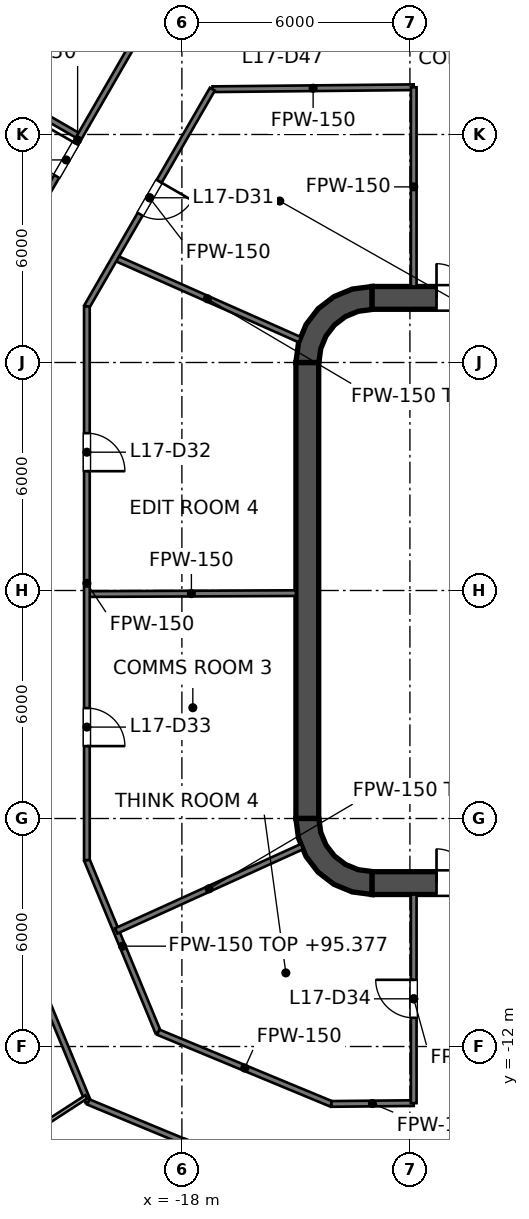
"""IFC4 building model, lengths in metres.
Left out: names, types, materials, properties, quantities, classifications, styles, units other than length and angle.
Written with IfcOpenShell. Run it as: python <this file> out.ifc"""

import sys

from ifc_helpers import new_model, si_unit, direction, frame, frame_2d, origin, place, context, subcontext, project, spatial, polyline, rectangle, outline, extrude, element, fill, save


model = new_model("IFC4")
c1 = context("Model", 3, precision=1e-05, world=origin(), true_north=direction((0.0, 1.0)))
c2 = subcontext(c1, "Body", "Model", "MODEL_VIEW")
j1 = project(units=[si_unit("LENGTHUNIT", "METRE"), si_unit("PLANEANGLEUNIT", "RADIAN")], contexts=[c1])
p1 = place(None, origin())
s1 = spatial("IfcSite", under=j1, at=p1, CompositionType="ELEMENT")
p2 = place(p1, origin())
s2 = spatial("IfcBuilding", under=s1, at=p2, CompositionType="ELEMENT")
p3 = place(p2, frame((0.0, 0.0, 92.4)))
s3 = spatial("IfcBuildingStorey", under=s2, at=p3, CompositionType="ELEMENT", Elevation=92.4)
p4 = place(p3, frame((-13.0, 7.7, 0.0), z_axis=(0.0, 0.0, 1.0), x_axis=(1.0, 0.0, 0.0)))
e1 = element("IfcWall", 1, at=p4, inside=s3, PredefinedType="SHEAR", context=c2, shape_type="SweptSolid", body=[
    extrude(rectangle(XDim=26.0, YDim=0.6, at=frame_2d((13.0, 0.0))), origin(), (0.0, 0.0, 1.0), 4.2),
])
p5 = place(p4, frame((1.7, 0.0, 0.0)))
e2 = element("IfcOpeningElement", 2, at=p5, cuts=e1, PredefinedType="OPENING", context=c2, shape_type="SweptSolid", body=[
    extrude(rectangle(XDim=1.8, YDim=2.1, at=frame_2d((0.9, 1.05))), frame((0.0, 0.3, 0.0), z_axis=(0.0, -1.0, 0.0), x_axis=(1.0, 0.0, 0.0)), (0.0, 0.0, 1.0), 0.6),
])
p6 = place(p4, frame((22.5, 0.0, 0.0)))
e3 = element("IfcOpeningElement", 3, at=p6, cuts=e1, PredefinedType="OPENING", context=c2, shape_type="SweptSolid", body=[
    extrude(rectangle(XDim=1.8, YDim=2.1, at=frame_2d((0.9, 1.05))), frame((0.0, 0.3, 0.0), z_axis=(0.0, -1.0, 0.0), x_axis=(1.0, 0.0, 0.0)), (0.0, 0.0, 1.0), 0.6),
])
p7 = place(p3, frame((-13.0, -7.7, 0.0), z_axis=(0.0, 0.0, 1.0), x_axis=(1.0, 0.0, 0.0)))
e4 = element("IfcWall", 4, at=p7, inside=s3, PredefinedType="SHEAR", context=c2, shape_type="SweptSolid", body=[
    extrude(rectangle(XDim=26.0, YDim=0.6, at=frame_2d((13.0, 0.0))), origin(), (0.0, 0.0, 1.0), 4.2),
])
p8 = place(p7, frame((1.7, 0.0, 0.0)))
e5 = element("IfcOpeningElement", 5, at=p8, cuts=e4, PredefinedType="OPENING", context=c2, shape_type="SweptSolid", body=[
    extrude(rectangle(XDim=1.8, YDim=2.1, at=frame_2d((0.9, 1.05))), frame((0.0, 0.3, 0.0), z_axis=(0.0, -1.0, 0.0), x_axis=(1.0, 0.0, 0.0)), (0.0, 0.0, 1.0), 0.6),
])
p9 = place(p7, frame((22.5, 0.0, 0.0)))
e6 = element("IfcOpeningElement", 6, at=p9, cuts=e4, PredefinedType="OPENING", context=c2, shape_type="SweptSolid", body=[
    extrude(rectangle(XDim=1.8, YDim=2.1, at=frame_2d((0.9, 1.05))), frame((0.0, 0.3, 0.0), z_axis=(0.0, -1.0, 0.0), x_axis=(1.0, 0.0, 0.0)), (0.0, 0.0, 1.0), 0.6),
])
p10 = place(p3, frame((-14.7, -6.0, 0.0), z_axis=(0.0, 0.0, 1.0), x_axis=(0.0, 1.0, 0.0)))
e7 = element("IfcWall", 7, at=p10, inside=s3, PredefinedType="SHEAR", context=c2, shape_type="SweptSolid", body=[
    extrude(rectangle(XDim=12.0, YDim=0.6, at=frame_2d((6.0, 0.0))), origin(), (0.0, 0.0, 1.0), 4.2),
])
p11 = place(p3, origin())
e8 = element("IfcWall", 8, at=p11, inside=s3, PredefinedType="SHEAR", context=c2, shape_type="SweptSolid", body=[
    extrude(outline(polyline([(-15.0, 6.0), (-14.395, 6.0), (-14.347, 6.361), (-14.208, 6.698), (-13.986, 6.986), (-13.698, 7.208), (-13.361, 7.347), (-13.0, 7.395), (-13.0, 8.0), (-13.518, 7.932), (-14.0, 7.732), (-14.414, 7.414), (-14.732, 7.0), (-14.932, 6.518), (-15.0, 6.0)])), origin(), (0.0, 0.0, 1.0), 4.2),
])
e9 = element("IfcWall", 9, at=p11, inside=s3, PredefinedType="SHEAR", context=c2, shape_type="SweptSolid", body=[
    extrude(outline(polyline([(-13.0, -8.0), (-13.0, -7.395), (-13.361, -7.347), (-13.698, -7.208), (-13.986, -6.986), (-14.208, -6.698), (-14.347, -6.361), (-14.395, -6.0), (-15.0, -6.0), (-14.932, -6.518), (-14.732, -7.0), (-14.414, -7.414), (-14.0, -7.732), (-13.518, -7.932), (-13.0, -8.0)])), origin(), (0.0, 0.0, 1.0), 4.2),
])
p12 = place(p3, frame((-11.8, -7.4, 0.0), z_axis=(0.0, 0.0, 1.0), x_axis=(0.0, 1.0, 0.0)))
e10 = element("IfcWall", 10, at=p12, inside=s3, PredefinedType="SOLIDWALL", context=c2, shape_type="SweptSolid", body=[
    extrude(rectangle(XDim=14.8, YDim=0.4, at=frame_2d((7.4, 0.0))), origin(), (0.0, 0.0, 1.0), 3.9),
])
p13 = place(p12, frame((11.2, 0.0, 0.0)))
e11 = element("IfcOpeningElement", 11, at=p13, cuts=e10, PredefinedType="OPENING", context=c2, shape_type="SweptSolid", body=[
    extrude(rectangle(XDim=1.1, YDim=2.1, at=frame_2d((0.55, 1.05))), frame((0.0, 0.2, 0.0), z_axis=(0.0, -1.0, 0.0), x_axis=(1.0, 0.0, 0.0)), (0.0, 0.0, 1.0), 0.4),
])
p14 = place(p12, frame((8.3, 0.0, 0.0)))
e12 = element("IfcOpeningElement", 12, at=p14, cuts=e10, PredefinedType="OPENING", context=c2, shape_type="SweptSolid", body=[
    extrude(rectangle(XDim=1.1, YDim=2.1, at=frame_2d((0.55, 1.05))), frame((0.0, 0.2, 0.0), z_axis=(0.0, -1.0, 0.0), x_axis=(1.0, 0.0, 0.0)), (0.0, 0.0, 1.0), 0.4),
])
p15 = place(p12, frame((5.4, 0.0, 0.0)))
e13 = element("IfcOpeningElement", 13, at=p15, cuts=e10, PredefinedType="OPENING", context=c2, shape_type="SweptSolid", body=[
    extrude(rectangle(XDim=1.1, YDim=2.1, at=frame_2d((0.55, 1.05))), frame((0.0, 0.2, 0.0), z_axis=(0.0, -1.0, 0.0), x_axis=(1.0, 0.0, 0.0)), (0.0, 0.0, 1.0), 0.4),
])
p16 = place(p12, frame((13.552, 0.0, 0.0)))
e14 = element("IfcOpeningElement", 14, at=p16, cuts=e10, PredefinedType="OPENING", context=c2, shape_type="SweptSolid", body=[
    extrude(rectangle(XDim=0.9, YDim=2.1, at=frame_2d((0.45, 1.05))), frame((0.0, 0.2, 0.0), z_axis=(0.0, -1.0, 0.0), x_axis=(1.0, 0.0, 0.0)), (0.0, 0.0, 1.0), 0.4),
])
p17 = place(p12, frame((0.347, 0.0, 0.0)))
e15 = element("IfcOpeningElement", 15, at=p17, cuts=e10, PredefinedType="OPENING", context=c2, shape_type="SweptSolid", body=[
    extrude(rectangle(XDim=0.9, YDim=2.1, at=frame_2d((0.45, 1.05))), frame((0.0, 0.2, 0.0), z_axis=(0.0, -1.0, 0.0), x_axis=(1.0, 0.0, 0.0)), (0.0, 0.0, 1.0), 0.4),
])
e16 = element("IfcWall", 16, at=p11, inside=s3, PredefinedType="SOLIDWALL", context=c2, shape_type="SweptSolid", body=[
    extrude(outline(polyline([(-12.0, -5.925), (-12.0, -5.675), (-14.15, -5.675), (-14.15, -3.025), (-12.0, -3.025), (-12.0, -2.775), (-14.15, -2.775), (-14.15, -0.125), (-12.0, -0.125), (-12.0, 0.125), (-14.15, 0.125), (-14.15, 2.775), (-12.0, 2.775), (-12.0, 3.025), (-14.15, 3.025), (-14.15, 5.675), (-12.0, 5.675), (-12.0, 5.925), (-14.15, 5.925), (-14.4, 5.925), (-14.4, 5.675), (-14.4, 3.025), (-14.4, 2.775), (-14.4, 0.125), (-14.4, -0.125), (-14.4, -2.775), (-14.4, -3.025), (-14.4, -5.675), (-14.4, -5.925), (-14.15, -5.925), (-12.0, -5.925)])), origin(), (0.0, 0.0, 1.0), 3.9),
])
p18 = place(p3, frame((-22.9, -7.572, 0.0), z_axis=(0.0, 0.0, 1.0), x_axis=(0.382367581622, -0.924010298928, 0.0)))
e17 = element("IfcWall", 17, at=p18, inside=s3, PredefinedType="PARTITIONING", context=c2, shape_type="SweptSolid", body=[
    extrude(rectangle(XDim=6.374, YDim=0.15, at=frame_2d((3.187, 0.0))), origin(), (0.0, 0.0, 1.0), 2.977),
])
p19 = place(p18, frame((2.6, 0.0, 0.0)))
e18 = element("IfcOpeningElement", 18, at=p19, cuts=e17, PredefinedType="OPENING", context=c2, shape_type="SweptSolid", body=[
    extrude(rectangle(XDim=1.0, YDim=2.1, at=frame_2d((0.5, 1.05))), frame((0.0, 0.075, 0.0), z_axis=(0.0, -1.0, 0.0), x_axis=(1.0, 0.0, 0.0)), (0.0, 0.0, 1.0), 0.15),
])
p20 = place(p3, frame((-20.5, -7.095, 0.0), z_axis=(0.0, 0.0, 1.0), x_axis=(0.382364990163, -0.924011371303, 0.0)))
e19 = element("IfcWall", 19, at=p20, inside=s3, PredefinedType="PARTITIONING", context=c2, shape_type="SweptSolid", body=[
    extrude(rectangle(XDim=4.902, YDim=0.15, at=frame_2d((2.451, 0.0))), origin(), (0.0, 0.0, 1.0), 2.977),
])
p21 = place(p3, frame((-25.131, 14.509, 0.0), z_axis=(0.0, 0.0, 1.0), x_axis=(0.866037334331, -0.499979335118, 0.0)))
e20 = element("IfcWall", 20, at=p21, inside=s3, PredefinedType="PARTITIONING", context=c2, shape_type="SweptSolid", body=[
    extrude(rectangle(XDim=5.128, YDim=0.15, at=frame_2d((2.564, 0.0))), origin(), (0.0, 0.0, 1.0), 3.045),
])
p22 = place(p3, frame((-19.76, 8.755, 0.0), z_axis=(0.0, 0.0, 1.0), x_axis=(0.91424834547, -0.405154245695, 0.0)))
e21 = element("IfcWall", 21, at=p22, inside=s3, PredefinedType="PARTITIONING", context=c2, shape_type="SweptSolid", body=[
    extrude(rectangle(XDim=5.318, YDim=0.15, at=frame_2d((2.659, 0.0))), origin(), (0.0, 0.0, 1.0), 2.977),
])
p23 = place(p3, frame((-20.46, -13.46, 0.0), z_axis=(0.0, 0.0, 1.0), x_axis=(0.923801547606, -0.382871650349, 0.0)))
e22 = element("IfcWall", 22, at=p23, inside=s3, PredefinedType="PARTITIONING", context=c2, shape_type="SweptSolid", body=[
    extrude(rectangle(XDim=6.415, YDim=0.15, at=frame_2d((3.208, 0.0))), origin(), (0.0, 0.0, 1.0), 2.968),
])
p24 = place(p23, frame((2.707, 0.0, 0.0)))
e23 = element("IfcOpeningElement", 23, at=p24, cuts=e22, PredefinedType="OPENING", context=c2, shape_type="SweptSolid", body=[
    extrude(rectangle(XDim=1.0, YDim=2.1, at=frame_2d((0.5, 1.05))), frame((0.0, 0.075, 0.0), z_axis=(0.0, -1.0, 0.0), x_axis=(1.0, 0.0, 0.0)), (0.0, 0.0, 1.0), 0.15),
])
p25 = place(p3, frame((-18.623, -11.623, 0.0), z_axis=(0.0, 0.0, 1.0), x_axis=(0.923791670587, -0.38289548098, 0.0)))
e24 = element("IfcWall", 24, at=p25, inside=s3, PredefinedType="PARTITIONING", context=c2, shape_type="SweptSolid", body=[
    extrude(rectangle(XDim=4.931, YDim=0.15, at=frame_2d((2.465, 0.0))), origin(), (0.0, 0.0, 1.0), 2.968),
])
p26 = place(p3, frame((-20.5, -0.094, 0.0), z_axis=(0.0, 0.0, 1.0), x_axis=(0.999990148138, 0.004438876723, 0.0)))
e25 = element("IfcWall", 25, at=p26, inside=s3, PredefinedType="PARTITIONING", context=c2, shape_type="SweptSolid", body=[
    extrude(rectangle(XDim=5.5, YDim=0.15, at=frame_2d((2.75, 0.0))), origin(), (0.0, 0.0, 1.0), 2.968),
])
p27 = place(p3, frame((-14.068, -13.511, 0.0), z_axis=(0.0, 0.0, 1.0), x_axis=(0.999950911515, 0.009908307647, 0.0)))
e26 = element("IfcWall", 26, at=p27, inside=s3, PredefinedType="PARTITIONING", context=c2, shape_type="SweptSolid", body=[
    extrude(rectangle(XDim=2.168, YDim=0.15, at=frame_2d((1.084, 0.0))), origin(), (0.0, 0.0, 1.0), 2.968),
])
p28 = place(p3, frame((-17.194, 13.191, 0.0), z_axis=(0.0, 0.0, 1.0), x_axis=(0.999950853109, 0.009914200296, 0.0)))
e27 = element("IfcWall", 27, at=p28, inside=s3, PredefinedType="PARTITIONING", context=c2, shape_type="SweptSolid", body=[
    extrude(rectangle(XDim=5.294, YDim=0.15, at=frame_2d((2.647, 0.0))), origin(), (0.0, 0.0, 1.0), 2.968),
])
p29 = place(p3, frame((-19.728, -8.958, 0.0), z_axis=(0.0, 0.0, 1.0), x_axis=(0.910629511797, 0.413223779863, 0.0)))
e28 = element("IfcWall", 28, at=p29, inside=s3, PredefinedType="PARTITIONING", context=c2, shape_type="SweptSolid", body=[
    extrude(rectangle(XDim=5.368, YDim=0.15, at=frame_2d((2.684, 0.0))), origin(), (0.0, 0.0, 1.0), 3.9),
])
p30 = place(p3, frame((-20.5, 7.474, 0.0), z_axis=(0.0, 0.0, 1.0), x_axis=(0.500012665616, 0.866018091164, 0.0)))
e29 = element("IfcWall", 29, at=p30, inside=s3, PredefinedType="PARTITIONING", context=c2, shape_type="SweptSolid", body=[
    extrude(rectangle(XDim=6.602, YDim=0.15, at=frame_2d((3.301, 0.0))), origin(), (0.0, 0.0, 1.0), 2.968),
])
p31 = place(p30, frame((2.803, 0.0, 0.0)))
e30 = element("IfcOpeningElement", 30, at=p31, cuts=e29, PredefinedType="OPENING", context=c2, shape_type="SweptSolid", body=[
    extrude(rectangle(XDim=1.0, YDim=2.1, at=frame_2d((0.5, 1.05))), frame((0.0, 0.075, 0.0), z_axis=(0.0, -1.0, 0.0), x_axis=(1.0, 0.0, 0.0)), (0.0, 0.0, 1.0), 0.15),
])
p32 = place(p3, frame((-22.9, 8.117, 0.0), z_axis=(0.0, 0.0, 1.0), x_axis=(0.5000050195, 0.866022505755, 0.0)))
e31 = element("IfcWall", 31, at=p32, inside=s3, PredefinedType="PARTITIONING", context=c2, shape_type="SweptSolid", body=[
    extrude(rectangle(XDim=8.626, YDim=0.15, at=frame_2d((4.313, 0.0))), origin(), (0.0, 0.0, 1.0), 2.968),
])
p33 = place(p32, frame((3.211, 0.0, 0.0)))
e32 = element("IfcOpeningElement", 32, at=p33, cuts=e31, PredefinedType="OPENING", context=c2, shape_type="SweptSolid", body=[
    extrude(rectangle(XDim=1.0, YDim=2.1, at=frame_2d((0.5, 1.05))), frame((0.0, 0.075, 0.0), z_axis=(0.0, -1.0, 0.0), x_axis=(1.0, 0.0, 0.0)), (0.0, 0.0, 1.0), 0.15),
])
p34 = place(p3, frame((-11.9, -13.49, 0.0), z_axis=(0.0, 0.0, 1.0), x_axis=(0.0, 1.0, 0.0)))
e33 = element("IfcWall", 33, at=p34, inside=s3, PredefinedType="PARTITIONING", context=c2, shape_type="SweptSolid", body=[
    extrude(rectangle(XDim=5.49, YDim=0.15, at=frame_2d((2.745, 0.0))), origin(), (0.0, 0.0, 1.0), 2.968),
])
p35 = place(p34, frame((2.245, 0.0, 0.0)))
e34 = element("IfcOpeningElement", 34, at=p35, cuts=e33, PredefinedType="OPENING", context=c2, shape_type="SweptSolid", body=[
    extrude(rectangle(XDim=1.0, YDim=2.1, at=frame_2d((0.5, 1.05))), frame((0.0, 0.075, 0.0), z_axis=(0.0, -1.0, 0.0), x_axis=(1.0, 0.0, 0.0)), (0.0, 0.0, 1.0), 0.15),
])
p36 = place(p3, frame((-11.9, 8.0, 0.0), z_axis=(0.0, 0.0, 1.0), x_axis=(0.0, 1.0, 0.0)))
e35 = element("IfcWall", 35, at=p36, inside=s3, PredefinedType="PARTITIONING", context=c2, shape_type="SweptSolid", body=[
    extrude(rectangle(XDim=5.243, YDim=0.15, at=frame_2d((2.622, 0.0))), origin(), (0.0, 0.0, 1.0), 2.968),
])
p37 = place(p3, frame((-20.5, -7.095, 0.0), z_axis=(0.0, 0.0, 1.0), x_axis=(0.0, 1.0, 0.0)))
e36 = element("IfcWall", 36, at=p37, inside=s3, PredefinedType="PARTITIONING", context=c2, shape_type="SweptSolid", body=[
    extrude(rectangle(XDim=14.569, YDim=0.15, at=frame_2d((7.285, 0.0))), origin(), (0.0, 0.0, 1.0), 2.968),
])
p38 = place(p37, frame((10.234, 0.0, 0.0)))
e37 = element("IfcOpeningElement", 37, at=p38, cuts=e36, PredefinedType="OPENING", context=c2, shape_type="SweptSolid", body=[
    extrude(rectangle(XDim=1.0, YDim=2.1, at=frame_2d((0.5, 1.05))), frame((0.0, 0.075, 0.0), z_axis=(0.0, -1.0, 0.0), x_axis=(1.0, 0.0, 0.0)), (0.0, 0.0, 1.0), 0.15),
])
p39 = place(p37, frame((3.0, 0.0, 0.0)))
e38 = element("IfcOpeningElement", 38, at=p39, cuts=e36, PredefinedType="OPENING", context=c2, shape_type="SweptSolid", body=[
    extrude(rectangle(XDim=1.0, YDim=2.1, at=frame_2d((0.5, 1.05))), frame((0.0, 0.075, 0.0), z_axis=(0.0, -1.0, 0.0), x_axis=(1.0, 0.0, 0.0)), (0.0, 0.0, 1.0), 0.15),
])
p40 = place(p3, frame((-23.706, -15.395, 0.0), z_axis=(0.0, 0.0, 1.0), x_axis=(0.838733884708, 0.544541523341, 0.0)))
e39 = element("IfcWall", 39, at=p40, inside=s3, PredefinedType="PARTITIONING", context=c2, shape_type="SweptSolid", body=[
    extrude(rectangle(XDim=3.803, YDim=0.1, at=frame_2d((1.902, 0.0))), origin(), (0.0, 0.0, 1.0), 3.9),
])
p41 = place(p13, origin())
e40 = element("IfcDoor", 40, at=p41, inside=s3, OperationType="DOUBLE_DOOR_SLIDING", PredefinedType="DOOR", context=c2, shape_type="SweptSolid", body=[
    extrude(rectangle(XDim=1.1, YDim=2.1, at=frame_2d((0.55, 1.05))), frame((0.0, 0.025, 0.0), z_axis=(0.0, -1.0, 0.0), x_axis=(1.0, 0.0, 0.0)), (0.0, 0.0, 1.0), 0.05),
])
fill(e11, e40)
p42 = place(p14, origin())
e41 = element("IfcDoor", 41, at=p42, inside=s3, OperationType="DOUBLE_DOOR_SLIDING", PredefinedType="DOOR", context=c2, shape_type="SweptSolid", body=[
    extrude(rectangle(XDim=1.1, YDim=2.1, at=frame_2d((0.55, 1.05))), frame((0.0, 0.025, 0.0), z_axis=(0.0, -1.0, 0.0), x_axis=(1.0, 0.0, 0.0)), (0.0, 0.0, 1.0), 0.05),
])
fill(e12, e41)
p43 = place(p15, origin())
e42 = element("IfcDoor", 42, at=p43, inside=s3, OperationType="DOUBLE_DOOR_SLIDING", PredefinedType="DOOR", context=c2, shape_type="SweptSolid", body=[
    extrude(rectangle(XDim=1.1, YDim=2.1, at=frame_2d((0.55, 1.05))), frame((0.0, 0.025, 0.0), z_axis=(0.0, -1.0, 0.0), x_axis=(1.0, 0.0, 0.0)), (0.0, 0.0, 1.0), 0.05),
])
fill(e13, e42)
p44 = place(p16, origin())
e43 = element("IfcDoor", 43, at=p44, inside=s3, OperationType="SINGLE_SWING_LEFT", PredefinedType="DOOR", context=c2, shape_type="SweptSolid", body=[
    extrude(rectangle(XDim=0.9, YDim=2.1, at=frame_2d((0.45, 1.05))), frame((0.0, 0.025, 0.0), z_axis=(0.0, -1.0, 0.0), x_axis=(1.0, 0.0, 0.0)), (0.0, 0.0, 1.0), 0.05),
])
fill(e14, e43)
p45 = place(p17, origin())
e44 = element("IfcDoor", 44, at=p45, inside=s3, OperationType="SINGLE_SWING_LEFT", PredefinedType="DOOR", context=c2, shape_type="SweptSolid", body=[
    extrude(rectangle(XDim=0.9, YDim=2.1, at=frame_2d((0.45, 1.05))), frame((0.0, 0.025, 0.0), z_axis=(0.0, -1.0, 0.0), x_axis=(1.0, 0.0, 0.0)), (0.0, 0.0, 1.0), 0.05),
])
fill(e15, e44)
p46 = place(p5, origin())
e45 = element("IfcDoor", 45, at=p46, inside=s3, OperationType="DOUBLE_DOOR_SINGLE_SWING", PredefinedType="DOOR", context=c2, shape_type="SweptSolid", body=[
    extrude(rectangle(XDim=1.8, YDim=2.1, at=frame_2d((0.9, 1.05))), frame((0.0, 0.025, 0.0), z_axis=(0.0, -1.0, 0.0), x_axis=(1.0, 0.0, 0.0)), (0.0, 0.0, 1.0), 0.05),
])
fill(e2, e45)
p47 = place(p8, origin())
e46 = element("IfcDoor", 46, at=p47, inside=s3, OperationType="DOUBLE_DOOR_SINGLE_SWING", PredefinedType="DOOR", context=c2, shape_type="SweptSolid", body=[
    extrude(rectangle(XDim=1.8, YDim=2.1, at=frame_2d((0.9, 1.05))), frame((0.0, 0.025, 0.0), z_axis=(0.0, -1.0, 0.0), x_axis=(1.0, 0.0, 0.0)), (0.0, 0.0, 1.0), 0.05),
])
fill(e5, e46)
p48 = place(p31, origin())
e47 = element("IfcDoor", 47, at=p48, inside=s3, OperationType="SINGLE_SWING_RIGHT", PredefinedType="DOOR", context=c2, shape_type="SweptSolid", body=[
    extrude(rectangle(XDim=1.0, YDim=2.1, at=frame_2d((0.5, 1.05))), frame((0.0, 0.025, 0.0), z_axis=(0.0, -1.0, 0.0), x_axis=(1.0, 0.0, 0.0)), (0.0, 0.0, 1.0), 0.05),
])
fill(e30, e47)
p49 = place(p38, origin())
e48 = element("IfcDoor", 48, at=p49, inside=s3, OperationType="SINGLE_SWING_LEFT", PredefinedType="DOOR", context=c2, shape_type="SweptSolid", body=[
    extrude(rectangle(XDim=1.0, YDim=2.1, at=frame_2d((0.5, 1.05))), frame((0.0, 0.025, 0.0), z_axis=(0.0, -1.0, 0.0), x_axis=(1.0, 0.0, 0.0)), (0.0, 0.0, 1.0), 0.05),
])
fill(e37, e48)
p50 = place(p39, origin())
e49 = element("IfcDoor", 49, at=p50, inside=s3, OperationType="SINGLE_SWING_LEFT", PredefinedType="DOOR", context=c2, shape_type="SweptSolid", body=[
    extrude(rectangle(XDim=1.0, YDim=2.1, at=frame_2d((0.5, 1.05))), frame((0.0, 0.025, 0.0), z_axis=(0.0, -1.0, 0.0), x_axis=(1.0, 0.0, 0.0)), (0.0, 0.0, 1.0), 0.05),
])
fill(e38, e49)
p51 = place(p35, origin())
e50 = element("IfcDoor", 50, at=p51, inside=s3, OperationType="SINGLE_SWING_RIGHT", PredefinedType="DOOR", context=c2, shape_type="SweptSolid", body=[
    extrude(rectangle(XDim=1.0, YDim=2.1, at=frame_2d((0.5, 1.05))), frame((0.0, 0.025, 0.0), z_axis=(0.0, -1.0, 0.0), x_axis=(1.0, 0.0, 0.0)), (0.0, 0.0, 1.0), 0.05),
])
fill(e34, e50)
p52 = place(p33, origin())
e51 = element("IfcDoor", 51, at=p52, inside=s3, OperationType="SINGLE_SWING_RIGHT", PredefinedType="DOOR", context=c2, shape_type="SweptSolid", body=[
    extrude(rectangle(XDim=1.0, YDim=2.1, at=frame_2d((0.5, 1.05))), frame((0.0, 0.025, 0.0), z_axis=(0.0, -1.0, 0.0), x_axis=(1.0, 0.0, 0.0)), (0.0, 0.0, 1.0), 0.05),
])
fill(e32, e51)
save(model, sys.argv[1])
